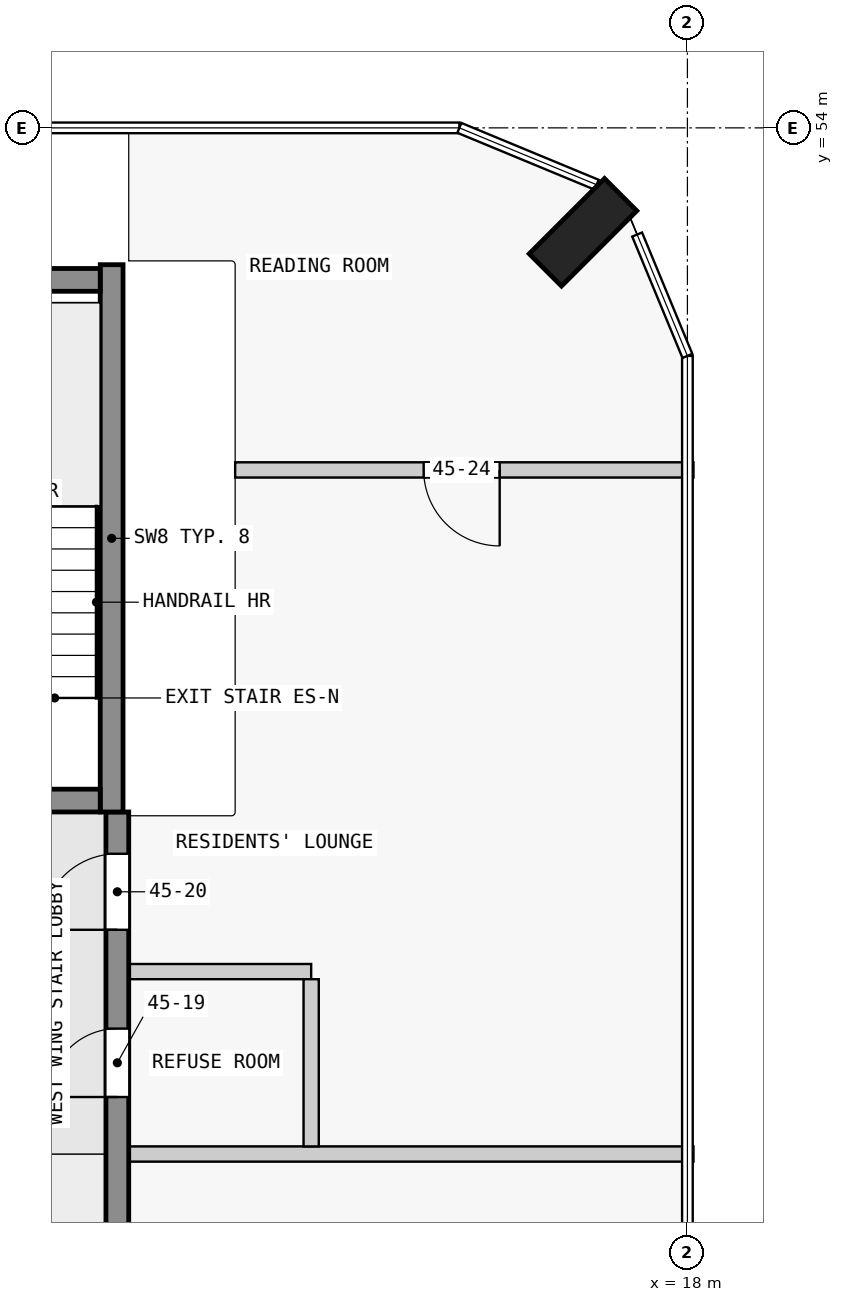
"""IFC4 building model, lengths in metres.
Left out: names, types, materials, properties, quantities, classifications, styles, units other than length and angle.
Written with IfcOpenShell. Run it as: python <this file> out.ifc"""

import sys

from ifc_helpers import new_model, si_unit, direction, frame, frame_2d, origin, origin_2d, place, context, subcontext, project, spatial, rectangle, extrude, element, fill, save


model = new_model("IFC4")
c1 = context("Model", 3, precision=1e-05, world=origin(), true_north=direction((0.0, 1.0)))
c2 = subcontext(c1, "Body", "Model", "MODEL_VIEW")
j1 = project(units=[si_unit("LENGTHUNIT", "METRE"), si_unit("PLANEANGLEUNIT", "RADIAN")], contexts=[c1])
p1 = place(None, origin())
s1 = spatial("IfcSite", under=j1, at=p1, CompositionType="ELEMENT")
p2 = place(p1, origin())
s2 = spatial("IfcBuilding", under=s1, at=p2, CompositionType="ELEMENT")
p3 = place(p2, frame((0.0, 0.0, 174.4)))
s3 = spatial("IfcBuildingStorey", under=s2, at=p3, CompositionType="ELEMENT", Elevation=174.4)
p4 = place(p3, frame((16.626, 52.626, 0.0), z_axis=(0.0, 0.0, 1.0), x_axis=(-0.707106781187, 0.707106781187, 0.0)))
e1 = element("IfcColumn", 1, at=p4, inside=s3, PredefinedType="COLUMN", context=c2, shape_type="SweptSolid", body=[
    extrude(rectangle(XDim=0.6, YDim=1.4, at=origin_2d()), origin(), (0.0, 0.0, 1.0), 3.5),
])
p5 = place(p3, frame((7.725, 45.15, 0.0), z_axis=(0.0, 0.0, 1.0), x_axis=(1.0, 0.0, 0.0)))
e2 = element("IfcWall", 2, at=p5, inside=s3, PredefinedType="SHEAR", context=c2, shape_type="SweptSolid", body=[
    extrude(rectangle(XDim=2.55, YDim=0.3, at=frame_2d((1.275, 0.0))), origin(), (0.0, 0.0, 1.0), 3.5),
])
p6 = place(p5, frame((0.725, 0.0, 0.0)))
e3 = element("IfcOpeningElement", 3, at=p6, cuts=e2, PredefinedType="OPENING", context=c2, shape_type="SweptSolid", body=[
    extrude(rectangle(XDim=1.1, YDim=2.1, at=frame_2d((0.55, 1.05))), frame((0.0, 0.16, 0.0), z_axis=(0.0, -1.0, 0.0), x_axis=(1.0, 0.0, 0.0)), (0.0, 0.0, 1.0), 0.32),
])
p7 = place(p3, frame((7.725, 52.0, 0.0), z_axis=(0.0, 0.0, 1.0), x_axis=(1.0, 0.0, 0.0)))
e4 = element("IfcWall", 4, at=p7, inside=s3, PredefinedType="SHEAR", context=c2, shape_type="SweptSolid", body=[
    extrude(rectangle(XDim=2.55, YDim=0.3, at=frame_2d((1.275, 0.0))), origin(), (0.0, 0.0, 1.0), 3.5),
])
p8 = place(p3, frame((10.425, 45.0, 0.0), z_axis=(0.0, 0.0, 1.0), x_axis=(0.0, 1.0, 0.0)))
e5 = element("IfcWall", 5, at=p8, inside=s3, PredefinedType="SHEAR", context=c2, shape_type="SweptSolid", body=[
    extrude(rectangle(XDim=7.2, YDim=0.3, at=frame_2d((3.6, 0.0))), origin(), (0.0, 0.0, 1.0), 3.5),
])
p9 = place(p3, frame((10.5, 18.0, 0.0), z_axis=(0.0, 0.0, 1.0), x_axis=(0.0, 1.0, 0.0)))
e6 = element("IfcWall", 6, at=p9, inside=s3, PredefinedType="SHEAR", context=c2, shape_type="SweptSolid", body=[
    extrude(rectangle(XDim=27.0, YDim=0.3, at=frame_2d((13.5, 0.0))), origin(), (0.0, 0.0, 1.0), 3.25),
])
p10 = place(p9, frame((1.75, 0.0, 0.0)))
e7 = element("IfcOpeningElement", 7, at=p10, cuts=e6, PredefinedType="OPENING", context=c2, shape_type="SweptSolid", body=[
    extrude(rectangle(XDim=1.0, YDim=2.1, at=frame_2d((0.5, 1.05))), frame((0.0, 0.16, 0.0), z_axis=(0.0, -1.0, 0.0), x_axis=(1.0, 0.0, 0.0)), (0.0, 0.0, 1.0), 0.32),
])
p11 = place(p9, frame((6.25, 0.0, 0.0)))
e8 = element("IfcOpeningElement", 8, at=p11, cuts=e6, PredefinedType="OPENING", context=c2, shape_type="SweptSolid", body=[
    extrude(rectangle(XDim=1.0, YDim=2.1, at=frame_2d((0.5, 1.05))), frame((0.0, 0.16, 0.0), z_axis=(0.0, -1.0, 0.0), x_axis=(1.0, 0.0, 0.0)), (0.0, 0.0, 1.0), 0.32),
])
p12 = place(p9, frame((10.75, 0.0, 0.0)))
e9 = element("IfcOpeningElement", 9, at=p12, cuts=e6, PredefinedType="OPENING", context=c2, shape_type="SweptSolid", body=[
    extrude(rectangle(XDim=1.0, YDim=2.1, at=frame_2d((0.5, 1.05))), frame((0.0, 0.16, 0.0), z_axis=(0.0, -1.0, 0.0), x_axis=(1.0, 0.0, 0.0)), (0.0, 0.0, 1.0), 0.32),
])
p13 = place(p9, frame((15.25, 0.0, 0.0)))
e10 = element("IfcOpeningElement", 10, at=p13, cuts=e6, PredefinedType="OPENING", context=c2, shape_type="SweptSolid", body=[
    extrude(rectangle(XDim=1.0, YDim=2.1, at=frame_2d((0.5, 1.05))), frame((0.0, 0.16, 0.0), z_axis=(0.0, -1.0, 0.0), x_axis=(1.0, 0.0, 0.0)), (0.0, 0.0, 1.0), 0.32),
])
p14 = place(p9, frame((19.75, 0.0, 0.0)))
e11 = element("IfcOpeningElement", 11, at=p14, cuts=e6, PredefinedType="OPENING", context=c2, shape_type="SweptSolid", body=[
    extrude(rectangle(XDim=1.0, YDim=2.1, at=frame_2d((0.5, 1.05))), frame((0.0, 0.16, 0.0), z_axis=(0.0, -1.0, 0.0), x_axis=(1.0, 0.0, 0.0)), (0.0, 0.0, 1.0), 0.32),
])
p15 = place(p9, frame((23.25, 0.0, 0.0)))
e12 = element("IfcOpeningElement", 12, at=p15, cuts=e6, PredefinedType="OPENING", context=c2, shape_type="SweptSolid", body=[
    extrude(rectangle(XDim=0.9, YDim=2.1, at=frame_2d((0.45, 1.05))), frame((0.0, 0.16, 0.0), z_axis=(0.0, -1.0, 0.0), x_axis=(1.0, 0.0, 0.0)), (0.0, 0.0, 1.0), 0.32),
])
p16 = place(p9, frame((25.45, 0.0, 0.0)))
e13 = element("IfcOpeningElement", 13, at=p16, cuts=e6, PredefinedType="OPENING", context=c2, shape_type="SweptSolid", body=[
    extrude(rectangle(XDim=1.0, YDim=2.1, at=frame_2d((0.5, 1.05))), frame((0.0, 0.16, 0.0), z_axis=(0.0, -1.0, 0.0), x_axis=(1.0, 0.0, 0.0)), (0.0, 0.0, 1.0), 0.32),
])
p17 = place(p3, frame((18.08, 40.5, 0.0), z_axis=(0.0, 0.0, 1.0), x_axis=(-1.0, 0.0, 0.0)))
e14 = element("IfcWall", 14, at=p17, inside=s3, PredefinedType="PARTITIONING", context=c2, shape_type="SweptSolid", body=[
    extrude(rectangle(XDim=7.43, YDim=0.2, at=frame_2d((3.715, 0.0))), origin(), (0.0, 0.0, 1.0), 3.25),
])
p18 = place(p3, frame((13.05, 42.9, 0.0), z_axis=(0.0, 0.0, 1.0), x_axis=(-1.0, 0.0, 0.0)))
e15 = element("IfcWall", 15, at=p18, inside=s3, PredefinedType="PARTITIONING", context=c2, shape_type="SweptSolid", body=[
    extrude(rectangle(XDim=2.4, YDim=0.2, at=frame_2d((1.2, 0.0))), origin(), (0.0, 0.0, 1.0), 3.25),
])
p19 = place(p3, frame((18.08, 49.5, 0.0), z_axis=(0.0, 0.0, 1.0), x_axis=(-1.0, 0.0, 0.0)))
e16 = element("IfcWall", 16, at=p19, inside=s3, PredefinedType="PARTITIONING", context=c2, shape_type="SweptSolid", body=[
    extrude(rectangle(XDim=6.03, YDim=0.2, at=frame_2d((3.015, 0.0))), origin(), (0.0, 0.0, 1.0), 3.25),
])
p20 = place(p19, frame((2.55, 0.0, 0.0)))
e17 = element("IfcOpeningElement", 17, at=p20, cuts=e16, PredefinedType="OPENING", context=c2, shape_type="SweptSolid", body=[
    extrude(rectangle(XDim=1.0, YDim=2.1, at=frame_2d((0.5, 1.05))), frame((0.0, 0.11, 0.0), z_axis=(0.0, -1.0, 0.0), x_axis=(1.0, 0.0, 0.0)), (0.0, 0.0, 1.0), 0.22),
])
p21 = place(p3, frame((13.05, 40.6, 0.0), z_axis=(0.0, 0.0, 1.0), x_axis=(0.0, 1.0, 0.0)))
e18 = element("IfcWall", 18, at=p21, inside=s3, PredefinedType="PARTITIONING", context=c2, shape_type="SweptSolid", body=[
    extrude(rectangle(XDim=2.2, YDim=0.2, at=frame_2d((1.1, 0.0))), origin(), (0.0, 0.0, 1.0), 3.25),
])
p22 = place(p15, origin())
e19 = element("IfcDoor", 19, at=p22, inside=s3, OperationType="SINGLE_SWING_RIGHT", PredefinedType="DOOR", context=c2, shape_type="SweptSolid", body=[
    extrude(rectangle(XDim=0.9, YDim=2.1, at=frame_2d((0.45, 1.05))), frame((0.0, 0.025, 0.0), z_axis=(0.0, -1.0, 0.0), x_axis=(1.0, 0.0, 0.0)), (0.0, 0.0, 1.0), 0.05),
])
fill(e12, e19)
p23 = place(p16, origin())
e20 = element("IfcDoor", 20, at=p23, inside=s3, OperationType="SINGLE_SWING_RIGHT", PredefinedType="DOOR", context=c2, shape_type="SweptSolid", body=[
    extrude(rectangle(XDim=1.0, YDim=2.1, at=frame_2d((0.5, 1.05))), frame((0.0, 0.025, 0.0), z_axis=(0.0, -1.0, 0.0), x_axis=(1.0, 0.0, 0.0)), (0.0, 0.0, 1.0), 0.05),
])
fill(e13, e20)
p24 = place(p20, origin())
e21 = element("IfcDoor", 21, at=p24, inside=s3, OperationType="SINGLE_SWING_RIGHT", PredefinedType="DOOR", context=c2, shape_type="SweptSolid", body=[
    extrude(rectangle(XDim=1.0, YDim=2.1, at=frame_2d((0.5, 1.05))), frame((0.0, 0.025, 0.0), z_axis=(0.0, -1.0, 0.0), x_axis=(1.0, 0.0, 0.0)), (0.0, 0.0, 1.0), 0.05),
])
fill(e17, e21)
save(model, sys.argv[1])
